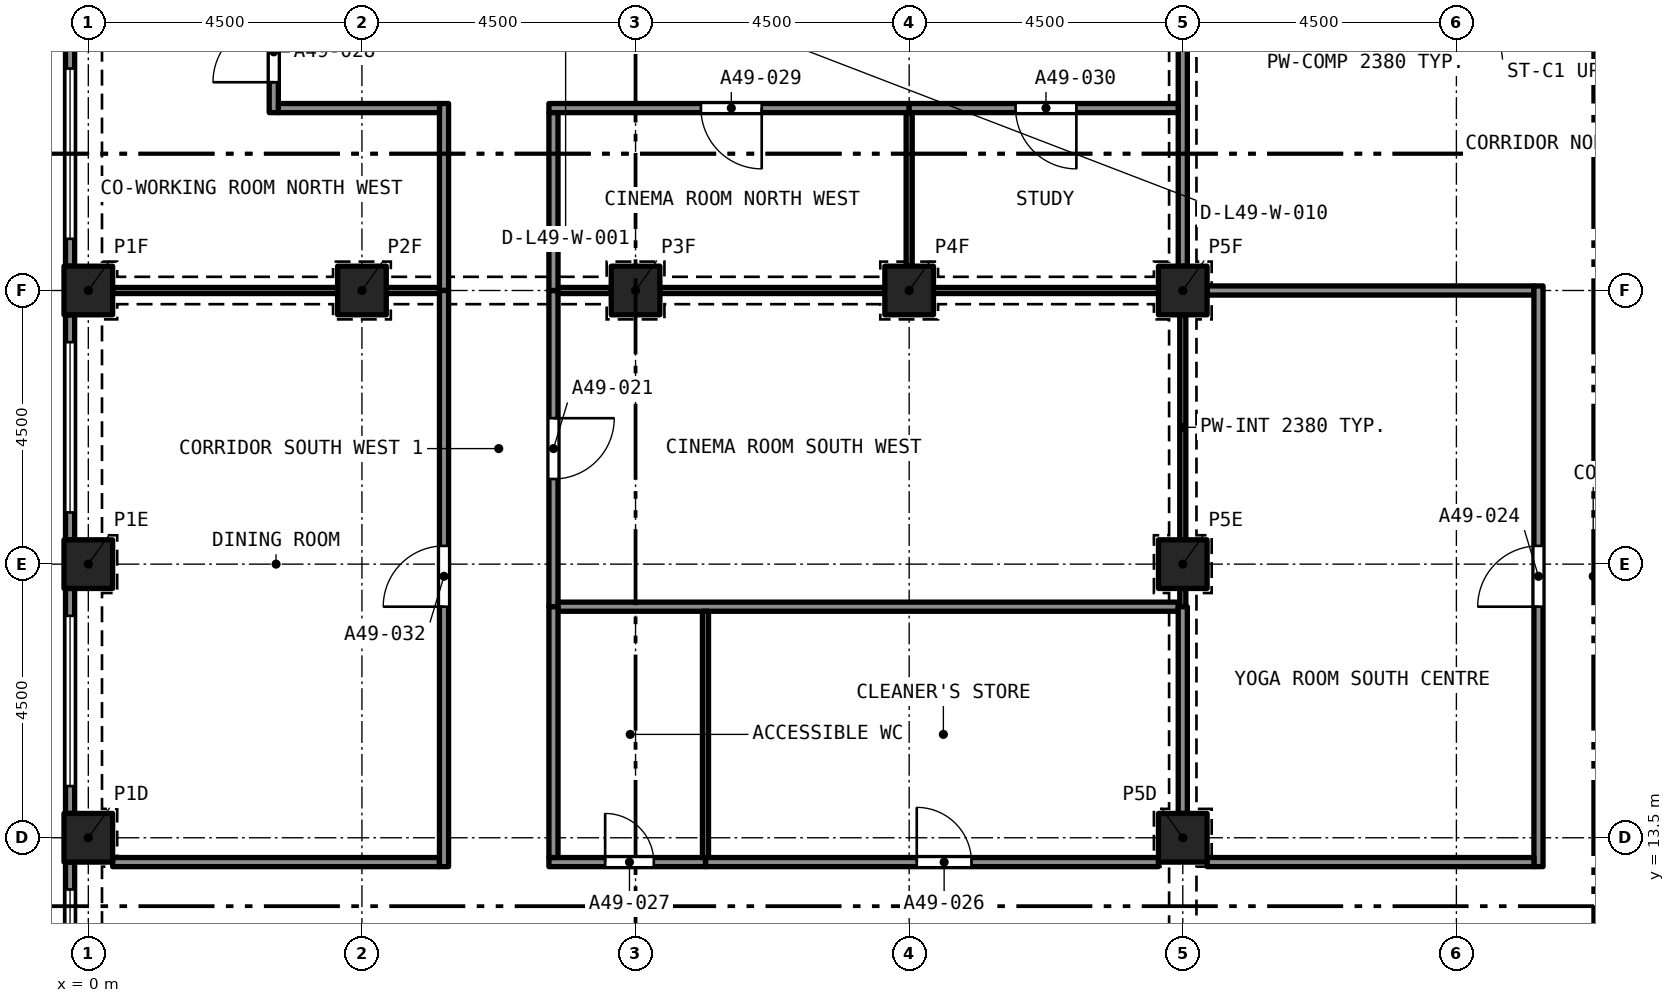
"""IFC4 building model, lengths in metres.
Left out: names, types, materials, properties, quantities, classifications, styles, units other than length and angle.
Written with IfcOpenShell. Run it as: python <this file> out.ifc"""

import sys

from ifc_helpers import new_model, si_unit, direction, frame, frame_2d, origin, origin_2d, place, context, subcontext, project, spatial, rectangle, extrude, element, fill, save


model = new_model("IFC4")
c1 = context("Model", 3, precision=1e-05, world=origin(), true_north=direction((0.0, 1.0)))
c2 = subcontext(c1, "Body", "Model", "MODEL_VIEW")
j1 = project(units=[si_unit("LENGTHUNIT", "METRE"), si_unit("PLANEANGLEUNIT", "RADIAN")], contexts=[c1])
p1 = place(None, origin())
s1 = spatial("IfcSite", under=j1, at=p1, CompositionType="ELEMENT")
p2 = place(p1, origin())
s2 = spatial("IfcBuilding", under=s1, at=p2, CompositionType="ELEMENT")
p3 = place(p2, frame((0.0, 0.0, 179.5)))
s3 = spatial("IfcBuildingStorey", under=s2, at=p3, CompositionType="ELEMENT", Elevation=179.5)
for number, where, z_axis, x_axis in (
    (1, (0.0, 13.5, 0.0), (0.0, 0.0, 1.0), (1.0, 0.0, 0.0)),
    (2, (18.0, 13.5, 0.0), (0.0, 0.0, 1.0), (1.0, 0.0, 0.0)),
    (3, (0.0, 18.0, 0.0), (0.0, 0.0, 1.0), (1.0, 0.0, 0.0)),
    (4, (18.0, 18.0, 0.0), (0.0, 0.0, 1.0), (1.0, 0.0, 0.0)),
    (5, (0.0, 22.5, 0.0), (0.0, 0.0, 1.0), (1.0, 0.0, 0.0)),
    (6, (4.5, 22.5, 0.0), (0.0, 0.0, 1.0), (1.0, 0.0, 0.0)),
    (7, (9.0, 22.5, 0.0), (0.0, 0.0, 1.0), (1.0, 0.0, 0.0)),
    (8, (13.5, 22.5, 0.0), (0.0, 0.0, 1.0), (1.0, 0.0, 0.0)),
    (9, (18.0, 22.5, 0.0), (0.0, 0.0, 1.0), (1.0, 0.0, 0.0)),
):
    element("IfcColumn", number, at=place(p3, frame(where, z_axis=z_axis, x_axis=x_axis)), inside=s3, PredefinedType="COLUMN", context=c2, shape_type="SweptSolid", body=[
        extrude(rectangle(XDim=0.8, YDim=0.8, at=origin_2d()), origin(), (0.0, 0.0, 1.0), 3.2),
    ])
p4 = place(p3, frame((-0.3, 22.9, 0.0), z_axis=(0.0, 0.0, 1.0), x_axis=(0.0, 1.0, 0.0)))
e10 = element("IfcWall", 10, at=p4, inside=s3, PredefinedType="SOLIDWALL", context=c2, shape_type="SweptSolid", body=[
    extrude(rectangle(XDim=3.7, YDim=0.15, at=frame_2d((1.85, 0.0))), origin(), (0.0, 0.0, 1.0), 3.2),
])
p5 = place(p4, frame((0.45, 0.0, 0.45)))
e11 = element("IfcOpeningElement", 11, at=p5, cuts=e10, PredefinedType="OPENING", context=c2, shape_type="SweptSolid", body=[
    extrude(rectangle(XDim=2.8, YDim=1.95, at=frame_2d((1.4, 0.975))), frame((0.0, 0.085, 0.0), z_axis=(0.0, -1.0, 0.0), x_axis=(1.0, 0.0, 0.0)), (0.0, 0.0, 1.0), 0.17),
])
p6 = place(p3, frame((-0.3, 18.4, 0.0), z_axis=(0.0, 0.0, 1.0), x_axis=(0.0, 1.0, 0.0)))
e12 = element("IfcWall", 12, at=p6, inside=s3, PredefinedType="SOLIDWALL", context=c2, shape_type="SweptSolid", body=[
    extrude(rectangle(XDim=3.7, YDim=0.15, at=frame_2d((1.85, 0.0))), origin(), (0.0, 0.0, 1.0), 3.2),
])
p7 = place(p6, frame((0.45, 0.0, 0.45)))
e13 = element("IfcOpeningElement", 13, at=p7, cuts=e12, PredefinedType="OPENING", context=c2, shape_type="SweptSolid", body=[
    extrude(rectangle(XDim=2.8, YDim=1.95, at=frame_2d((1.4, 0.975))), frame((0.0, 0.085, 0.0), z_axis=(0.0, -1.0, 0.0), x_axis=(1.0, 0.0, 0.0)), (0.0, 0.0, 1.0), 0.17),
])
p8 = place(p3, frame((-0.3, 13.9, 0.0), z_axis=(0.0, 0.0, 1.0), x_axis=(0.0, 1.0, 0.0)))
e14 = element("IfcWall", 14, at=p8, inside=s3, PredefinedType="SOLIDWALL", context=c2, shape_type="SweptSolid", body=[
    extrude(rectangle(XDim=3.7, YDim=0.15, at=frame_2d((1.85, 0.0))), origin(), (0.0, 0.0, 1.0), 3.2),
])
p9 = place(p8, frame((0.45, 0.0, 0.45)))
e15 = element("IfcOpeningElement", 15, at=p9, cuts=e14, PredefinedType="OPENING", context=c2, shape_type="SweptSolid", body=[
    extrude(rectangle(XDim=2.8, YDim=1.95, at=frame_2d((1.4, 0.975))), frame((0.0, 0.085, 0.0), z_axis=(0.0, -1.0, 0.0), x_axis=(1.0, 0.0, 0.0)), (0.0, 0.0, 1.0), 0.17),
])
p10 = place(p3, frame((-0.3, 9.4, 0.0), z_axis=(0.0, 0.0, 1.0), x_axis=(0.0, 1.0, 0.0)))
e16 = element("IfcWall", 16, at=p10, inside=s3, PredefinedType="SOLIDWALL", context=c2, shape_type="SweptSolid", body=[
    extrude(rectangle(XDim=3.7, YDim=0.15, at=frame_2d((1.85, 0.0))), origin(), (0.0, 0.0, 1.0), 3.2),
])
p11 = place(p10, frame((0.45, 0.0, 0.45)))
e17 = element("IfcOpeningElement", 17, at=p11, cuts=e16, PredefinedType="OPENING", context=c2, shape_type="SweptSolid", body=[
    extrude(rectangle(XDim=2.8, YDim=1.95, at=frame_2d((1.4, 0.975))), frame((0.0, 0.085, 0.0), z_axis=(0.0, -1.0, 0.0), x_axis=(1.0, 0.0, 0.0)), (0.0, 0.0, 1.0), 0.17),
])
p12 = place(p3, frame((18.0, 18.4, 0.0), z_axis=(0.0, 0.0, 1.0), x_axis=(0.0, 1.0, 0.0)))
e18 = element("IfcWall", 18, at=p12, inside=s3, PredefinedType="PARTITIONING", context=c2, shape_type="SweptSolid", body=[
    extrude(rectangle(XDim=3.7, YDim=0.1, at=frame_2d((1.85, 0.0))), origin(), (0.0, 0.0, 1.0), 2.38),
])
p13 = place(p3, frame((18.0, 17.3, 0.0), z_axis=(0.0, 0.0, 1.0), x_axis=(0.0, 1.0, 0.0)))
e19 = element("IfcWall", 19, at=p13, inside=s3, PredefinedType="PARTITIONING", context=c2, shape_type="SweptSolid", body=[
    extrude(rectangle(XDim=0.3, YDim=0.1, at=frame_2d((0.15, 0.0))), origin(), (0.0, 0.0, 1.0), 2.75),
])
p14 = place(p3, frame((7.65, 22.5, 0.0), z_axis=(0.0, 0.0, 1.0), x_axis=(0.0, -1.0, 0.0)))
e20 = element("IfcWall", 20, at=p14, inside=s3, PredefinedType="PARTITIONING", context=c2, shape_type="SweptSolid", body=[
    extrude(rectangle(XDim=5.2, YDim=0.15, at=frame_2d((2.6, 0.0))), origin(), (0.0, 0.0, 1.0), 2.9),
])
p15 = place(p14, frame((2.1, 0.0, 0.0)))
e21 = element("IfcOpeningElement", 21, at=p15, cuts=e20, PredefinedType="OPENING", context=c2, shape_type="SweptSolid", body=[
    extrude(rectangle(XDim=1.0, YDim=2.1, at=frame_2d((0.5, 1.05))), frame((0.0, 0.085, 0.0), z_axis=(0.0, -1.0, 0.0), x_axis=(1.0, 0.0, 0.0)), (0.0, 0.0, 1.0), 0.17),
])
p16 = place(p3, frame((7.725, 22.5, 0.0), z_axis=(0.0, 0.0, 1.0), x_axis=(1.0, 0.0, 0.0)))
e22 = element("IfcWall", 22, at=p16, inside=s3, PredefinedType="PARTITIONING", context=c2, shape_type="SweptSolid", body=[
    extrude(rectangle(XDim=0.875, YDim=0.1, at=frame_2d((0.438, 0.0))), origin(), (0.0, 0.0, 1.0), 2.38),
])
for number, where, z_axis, x_axis in (
    (23, (9.4, 22.5, 0.0), (0.0, 0.0, 1.0), (1.0, 0.0, 0.0)),
    (24, (13.9, 22.5, 0.0), (0.0, 0.0, 1.0), (1.0, 0.0, 0.0)),
):
    element("IfcWall", number, at=place(p3, frame(where, z_axis=z_axis, x_axis=x_axis)), inside=s3, PredefinedType="PARTITIONING", context=c2, shape_type="SweptSolid", body=[
        extrude(rectangle(XDim=3.7, YDim=0.1, at=frame_2d((1.85, 0.0))), origin(), (0.0, 0.0, 1.0), 2.38),
    ])
p17 = place(p3, frame((7.725, 17.3, 0.0), z_axis=(0.0, 0.0, 1.0), x_axis=(1.0, 0.0, 0.0)))
e25 = element("IfcWall", 25, at=p17, inside=s3, PredefinedType="PARTITIONING", context=c2, shape_type="SweptSolid", body=[
    extrude(rectangle(XDim=10.2, YDim=0.15, at=frame_2d((5.1, 0.0))), origin(), (0.0, 0.0, 1.0), 2.9),
])
p18 = place(p3, frame((18.4, 22.5, 0.0), z_axis=(0.0, 0.0, 1.0), x_axis=(1.0, 0.0, 0.0)))
e26 = element("IfcWall", 26, at=p18, inside=s3, PredefinedType="PARTITIONING", context=c2, shape_type="SweptSolid", body=[
    extrude(rectangle(XDim=5.375, YDim=0.15, at=frame_2d((2.688, 0.0))), origin(), (0.0, 0.0, 1.0), 2.75),
])
p19 = place(p3, frame((18.0, 22.9, 0.0), z_axis=(0.0, 0.0, 1.0), x_axis=(0.0, 1.0, 0.0)))
e27 = element("IfcWall", 27, at=p19, inside=s3, PredefinedType="PARTITIONING", context=c2, shape_type="SweptSolid", body=[
    extrude(rectangle(XDim=3.7, YDim=0.15, at=frame_2d((1.85, 0.0))), origin(), (0.0, 0.0, 1.0), 2.38),
])
p20 = place(p3, frame((23.85, 13.025, 0.0), z_axis=(0.0, 0.0, 1.0), x_axis=(0.0, 1.0, 0.0)))
e28 = element("IfcWall", 28, at=p20, inside=s3, PredefinedType="PARTITIONING", context=c2, shape_type="SweptSolid", body=[
    extrude(rectangle(XDim=9.55, YDim=0.15, at=frame_2d((4.775, 0.0))), origin(), (0.0, 0.0, 1.0), 2.75),
])
p21 = place(p20, frame((4.275, 0.0, 0.0)))
e29 = element("IfcOpeningElement", 29, at=p21, cuts=e28, PredefinedType="OPENING", context=c2, shape_type="SweptSolid", body=[
    extrude(rectangle(XDim=1.0, YDim=2.1, at=frame_2d((0.5, 1.05))), frame((0.0, 0.085, 0.0), z_axis=(0.0, -1.0, 0.0), x_axis=(1.0, 0.0, 0.0)), (0.0, 0.0, 1.0), 0.17),
])
p22 = place(p3, frame((18.4, 13.1, 0.0), z_axis=(0.0, 0.0, 1.0), x_axis=(1.0, 0.0, 0.0)))
e30 = element("IfcWall", 30, at=p22, inside=s3, PredefinedType="PARTITIONING", context=c2, shape_type="SweptSolid", body=[
    extrude(rectangle(XDim=5.375, YDim=0.15, at=frame_2d((2.688, 0.0))), origin(), (0.0, 0.0, 1.0), 2.75),
])
p23 = place(p3, frame((10.15, 13.1, 0.0), z_axis=(0.0, 0.0, 1.0), x_axis=(1.0, 0.0, 0.0)))
e31 = element("IfcWall", 31, at=p23, inside=s3, PredefinedType="PARTITIONING", context=c2, shape_type="SweptSolid", body=[
    extrude(rectangle(XDim=7.45, YDim=0.15, at=frame_2d((3.725, 0.0))), origin(), (0.0, 0.0, 1.0), 2.9),
])
p24 = place(p23, frame((3.475, 0.0, 0.0)))
e32 = element("IfcOpeningElement", 32, at=p24, cuts=e31, PredefinedType="OPENING", context=c2, shape_type="SweptSolid", body=[
    extrude(rectangle(XDim=0.9, YDim=2.1, at=frame_2d((0.45, 1.05))), frame((0.0, 0.085, 0.0), z_axis=(0.0, -1.0, 0.0), x_axis=(1.0, 0.0, 0.0)), (0.0, 0.0, 1.0), 0.17),
])
p25 = place(p3, frame((7.575, 13.1, 0.0), z_axis=(0.0, 0.0, 1.0), x_axis=(1.0, 0.0, 0.0)))
e33 = element("IfcWall", 33, at=p25, inside=s3, PredefinedType="PARTITIONING", context=c2, shape_type="SweptSolid", body=[
    extrude(rectangle(XDim=2.575, YDim=0.15, at=frame_2d((1.288, 0.0))), origin(), (0.0, 0.0, 1.0), 2.9),
])
p26 = place(p25, frame((0.925, 0.0, 0.0)))
e34 = element("IfcOpeningElement", 34, at=p26, cuts=e33, PredefinedType="OPENING", context=c2, shape_type="SweptSolid", body=[
    extrude(rectangle(XDim=0.8, YDim=2.1, at=frame_2d((0.4, 1.05))), frame((0.0, 0.085, 0.0), z_axis=(0.0, -1.0, 0.0), x_axis=(1.0, 0.0, 0.0)), (0.0, 0.0, 1.0), 0.17),
])
p27 = place(p3, frame((0.4, 13.1, 0.0), z_axis=(0.0, 0.0, 1.0), x_axis=(1.0, 0.0, 0.0)))
e35 = element("IfcWall", 35, at=p27, inside=s3, PredefinedType="PARTITIONING", context=c2, shape_type="SweptSolid", body=[
    extrude(rectangle(XDim=5.375, YDim=0.15, at=frame_2d((2.688, 0.0))), origin(), (0.0, 0.0, 1.0), 2.9),
])
p28 = place(p3, frame((18.0, 13.9, 0.0), z_axis=(0.0, 0.0, 1.0), x_axis=(0.0, 1.0, 0.0)))
e36 = element("IfcWall", 36, at=p28, inside=s3, PredefinedType="PARTITIONING", context=c2, shape_type="SweptSolid", body=[
    extrude(rectangle(XDim=3.4, YDim=0.15, at=frame_2d((1.7, 0.0))), origin(), (0.0, 0.0, 1.0), 2.38),
])
p29 = place(p3, frame((5.85, 22.5, 0.0), z_axis=(0.0, 0.0, 1.0), x_axis=(0.0, 1.0, 0.0)))
e37 = element("IfcWall", 37, at=p29, inside=s3, PredefinedType="PARTITIONING", context=c2, shape_type="SweptSolid", body=[
    extrude(rectangle(XDim=3.075, YDim=0.15, at=frame_2d((1.538, 0.0))), origin(), (0.0, 0.0, 1.0), 2.9),
])
p30 = place(p3, frame((3.125, 25.5, 0.0), z_axis=(0.0, 0.0, 1.0), x_axis=(1.0, 0.0, 0.0)))
e38 = element("IfcWall", 38, at=p30, inside=s3, PredefinedType="PARTITIONING", context=c2, shape_type="SweptSolid", body=[
    extrude(rectangle(XDim=2.65, YDim=0.15, at=frame_2d((1.325, 0.0))), origin(), (0.0, 0.0, 1.0), 2.9),
])
p31 = place(p3, frame((3.05, 25.425, 0.0), z_axis=(0.0, 0.0, 1.0), x_axis=(0.0, 1.0, 0.0)))
e39 = element("IfcWall", 39, at=p31, inside=s3, PredefinedType="PARTITIONING", context=c2, shape_type="SweptSolid", body=[
    extrude(rectangle(XDim=1.925, YDim=0.15, at=frame_2d((0.962, 0.0))), origin(), (0.0, 0.0, 1.0), 2.9),
])
p32 = place(p31, frame((0.5, 0.0, 0.0)))
e40 = element("IfcOpeningElement", 40, at=p32, cuts=e39, PredefinedType="OPENING", context=c2, shape_type="SweptSolid", body=[
    extrude(rectangle(XDim=1.0, YDim=2.1, at=frame_2d((0.5, 1.05))), frame((0.0, 0.085, 0.0), z_axis=(0.0, -1.0, 0.0), x_axis=(1.0, 0.0, 0.0)), (0.0, 0.0, 1.0), 0.17),
])
p33 = place(p3, frame((13.5, 25.5, 0.0), z_axis=(0.0, 0.0, 1.0), x_axis=(-1.0, 0.0, 0.0)))
e41 = element("IfcWall", 41, at=p33, inside=s3, PredefinedType="PARTITIONING", context=c2, shape_type="SweptSolid", body=[
    extrude(rectangle(XDim=5.925, YDim=0.15, at=frame_2d((2.962, 0.0))), origin(), (0.0, 0.0, 1.0), 2.9),
])
p34 = place(p33, frame((2.425, 0.0, 0.0)))
e42 = element("IfcOpeningElement", 42, at=p34, cuts=e41, PredefinedType="OPENING", context=c2, shape_type="SweptSolid", body=[
    extrude(rectangle(XDim=1.0, YDim=2.1, at=frame_2d((0.5, 1.05))), frame((0.0, 0.085, 0.0), z_axis=(0.0, -1.0, 0.0), x_axis=(1.0, 0.0, 0.0)), (0.0, 0.0, 1.0), 0.17),
])
p35 = place(p3, frame((7.65, 22.5, 0.0), z_axis=(0.0, 0.0, 1.0), x_axis=(0.0, 1.0, 0.0)))
e43 = element("IfcWall", 43, at=p35, inside=s3, PredefinedType="PARTITIONING", context=c2, shape_type="SweptSolid", body=[
    extrude(rectangle(XDim=2.925, YDim=0.15, at=frame_2d((1.462, 0.0))), origin(), (0.0, 0.0, 1.0), 2.9),
])
p36 = place(p3, frame((17.925, 25.5, 0.0), z_axis=(0.0, 0.0, 1.0), x_axis=(-1.0, 0.0, 0.0)))
e44 = element("IfcWall", 44, at=p36, inside=s3, PredefinedType="PARTITIONING", context=c2, shape_type="SweptSolid", body=[
    extrude(rectangle(XDim=4.425, YDim=0.15, at=frame_2d((2.212, 0.0))), origin(), (0.0, 0.0, 1.0), 2.9),
])
p37 = place(p36, frame((1.675, 0.0, 0.0)))
e45 = element("IfcOpeningElement", 45, at=p37, cuts=e44, PredefinedType="OPENING", context=c2, shape_type="SweptSolid", body=[
    extrude(rectangle(XDim=1.0, YDim=2.1, at=frame_2d((0.5, 1.05))), frame((0.0, 0.085, 0.0), z_axis=(0.0, -1.0, 0.0), x_axis=(1.0, 0.0, 0.0)), (0.0, 0.0, 1.0), 0.17),
])
p38 = place(p3, frame((7.65, 13.175, 0.0), z_axis=(0.0, 0.0, 1.0), x_axis=(0.0, 1.0, 0.0)))
e46 = element("IfcWall", 46, at=p38, inside=s3, PredefinedType="PARTITIONING", context=c2, shape_type="SweptSolid", body=[
    extrude(rectangle(XDim=4.125, YDim=0.15, at=frame_2d((2.062, 0.0))), origin(), (0.0, 0.0, 1.0), 2.9),
])
p39 = place(p3, frame((5.85, 13.025, 0.0), z_axis=(0.0, 0.0, 1.0), x_axis=(0.0, 1.0, 0.0)))
e47 = element("IfcWall", 47, at=p39, inside=s3, PredefinedType="PARTITIONING", context=c2, shape_type="SweptSolid", body=[
    extrude(rectangle(XDim=9.475, YDim=0.15, at=frame_2d((4.738, 0.0))), origin(), (0.0, 0.0, 1.0), 2.9),
])
p40 = place(p39, frame((4.275, 0.0, 0.0)))
e48 = element("IfcOpeningElement", 48, at=p40, cuts=e47, PredefinedType="OPENING", context=c2, shape_type="SweptSolid", body=[
    extrude(rectangle(XDim=1.0, YDim=2.1, at=frame_2d((0.5, 1.05))), frame((0.0, 0.085, 0.0), z_axis=(0.0, -1.0, 0.0), x_axis=(1.0, 0.0, 0.0)), (0.0, 0.0, 1.0), 0.17),
])
p41 = place(p3, frame((4.9, 22.5, 0.0), z_axis=(0.0, 0.0, 1.0), x_axis=(1.0, 0.0, 0.0)))
e49 = element("IfcWall", 49, at=p41, inside=s3, PredefinedType="PARTITIONING", context=c2, shape_type="SweptSolid", body=[
    extrude(rectangle(XDim=0.875, YDim=0.1, at=frame_2d((0.438, 0.0))), origin(), (0.0, 0.0, 1.0), 2.38),
])
p42 = place(p3, frame((0.4, 22.5, 0.0), z_axis=(0.0, 0.0, 1.0), x_axis=(1.0, 0.0, 0.0)))
e50 = element("IfcWall", 50, at=p42, inside=s3, PredefinedType="PARTITIONING", context=c2, shape_type="SweptSolid", body=[
    extrude(rectangle(XDim=3.7, YDim=0.1, at=frame_2d((1.85, 0.0))), origin(), (0.0, 0.0, 1.0), 2.38),
])
p43 = place(p3, frame((13.5, 22.9, 0.0), z_axis=(0.0, 0.0, 1.0), x_axis=(0.0, 1.0, 0.0)))
e51 = element("IfcWall", 51, at=p43, inside=s3, PredefinedType="PARTITIONING", context=c2, shape_type="SweptSolid", body=[
    extrude(rectangle(XDim=2.525, YDim=0.1, at=frame_2d((1.263, 0.0))), origin(), (0.0, 0.0, 1.0), 2.9),
])
p44 = place(p3, frame((10.15, 13.175, 0.0), z_axis=(0.0, 0.0, 1.0), x_axis=(0.0, 1.0, 0.0)))
e52 = element("IfcWall", 52, at=p44, inside=s3, PredefinedType="PARTITIONING", context=c2, shape_type="SweptSolid", body=[
    extrude(rectangle(XDim=4.05, YDim=0.1, at=frame_2d((2.025, 0.0))), origin(), (0.0, 0.0, 1.0), 2.9),
])
p45 = place(p5, origin())
e53 = element("IfcWindow", 53, at=p45, inside=s3, PartitioningType="SINGLE_PANEL", PredefinedType="WINDOW", context=c2, shape_type="SweptSolid", body=[
    extrude(rectangle(XDim=2.8, YDim=1.95, at=frame_2d((1.4, 0.975))), frame((0.0, 0.03, 0.0), z_axis=(0.0, -1.0, 0.0), x_axis=(1.0, 0.0, 0.0)), (0.0, 0.0, 1.0), 0.06),
])
fill(e11, e53)
p46 = place(p7, origin())
e54 = element("IfcWindow", 54, at=p46, inside=s3, PartitioningType="SINGLE_PANEL", PredefinedType="WINDOW", context=c2, shape_type="SweptSolid", body=[
    extrude(rectangle(XDim=2.8, YDim=1.95, at=frame_2d((1.4, 0.975))), frame((0.0, 0.03, 0.0), z_axis=(0.0, -1.0, 0.0), x_axis=(1.0, 0.0, 0.0)), (0.0, 0.0, 1.0), 0.06),
])
fill(e13, e54)
p47 = place(p9, origin())
e55 = element("IfcWindow", 55, at=p47, inside=s3, PartitioningType="SINGLE_PANEL", PredefinedType="WINDOW", context=c2, shape_type="SweptSolid", body=[
    extrude(rectangle(XDim=2.8, YDim=1.95, at=frame_2d((1.4, 0.975))), frame((0.0, 0.03, 0.0), z_axis=(0.0, -1.0, 0.0), x_axis=(1.0, 0.0, 0.0)), (0.0, 0.0, 1.0), 0.06),
])
fill(e15, e55)
p48 = place(p11, origin())
e56 = element("IfcWindow", 56, at=p48, inside=s3, PartitioningType="SINGLE_PANEL", PredefinedType="WINDOW", context=c2, shape_type="SweptSolid", body=[
    extrude(rectangle(XDim=2.8, YDim=1.95, at=frame_2d((1.4, 0.975))), frame((0.0, 0.03, 0.0), z_axis=(0.0, -1.0, 0.0), x_axis=(1.0, 0.0, 0.0)), (0.0, 0.0, 1.0), 0.06),
])
fill(e17, e56)
p49 = place(p15, origin())
e57 = element("IfcDoor", 57, at=p49, inside=s3, OperationType="SINGLE_SWING_RIGHT", PredefinedType="DOOR", context=c2, shape_type="SweptSolid", body=[
    extrude(rectangle(XDim=1.0, YDim=2.1, at=frame_2d((0.5, 1.05))), frame((0.0, 0.025, 0.0), z_axis=(0.0, -1.0, 0.0), x_axis=(1.0, 0.0, 0.0)), (0.0, 0.0, 1.0), 0.05),
])
fill(e21, e57)
p50 = place(p21, origin())
e58 = element("IfcDoor", 58, at=p50, inside=s3, OperationType="SINGLE_SWING_RIGHT", PredefinedType="DOOR", context=c2, shape_type="SweptSolid", body=[
    extrude(rectangle(XDim=1.0, YDim=2.1, at=frame_2d((0.5, 1.05))), frame((0.0, 0.025, 0.0), z_axis=(0.0, -1.0, 0.0), x_axis=(1.0, 0.0, 0.0)), (0.0, 0.0, 1.0), 0.05),
])
fill(e29, e58)
p51 = place(p24, origin())
e59 = element("IfcDoor", 59, at=p51, inside=s3, OperationType="SINGLE_SWING_RIGHT", PredefinedType="DOOR", context=c2, shape_type="SweptSolid", body=[
    extrude(rectangle(XDim=0.9, YDim=2.1, at=frame_2d((0.45, 1.05))), frame((0.0, 0.025, 0.0), z_axis=(0.0, -1.0, 0.0), x_axis=(1.0, 0.0, 0.0)), (0.0, 0.0, 1.0), 0.05),
])
fill(e32, e59)
p52 = place(p26, origin())
e60 = element("IfcDoor", 60, at=p52, inside=s3, OperationType="SINGLE_SWING_RIGHT", PredefinedType="DOOR", context=c2, shape_type="SweptSolid", body=[
    extrude(rectangle(XDim=0.8, YDim=2.1, at=frame_2d((0.4, 1.05))), frame((0.0, 0.025, 0.0), z_axis=(0.0, -1.0, 0.0), x_axis=(1.0, 0.0, 0.0)), (0.0, 0.0, 1.0), 0.05),
])
fill(e34, e60)
p53 = place(p32, origin())
e61 = element("IfcDoor", 61, at=p53, inside=s3, OperationType="SINGLE_SWING_RIGHT", PredefinedType="DOOR", context=c2, shape_type="SweptSolid", body=[
    extrude(rectangle(XDim=1.0, YDim=2.1, at=frame_2d((0.5, 1.05))), frame((0.0, 0.025, 0.0), z_axis=(0.0, -1.0, 0.0), x_axis=(1.0, 0.0, 0.0)), (0.0, 0.0, 1.0), 0.05),
])
fill(e40, e61)
p54 = place(p34, origin())
e62 = element("IfcDoor", 62, at=p54, inside=s3, OperationType="SINGLE_SWING_LEFT", PredefinedType="DOOR", context=c2, shape_type="SweptSolid", body=[
    extrude(rectangle(XDim=1.0, YDim=2.1, at=frame_2d((0.5, 1.05))), frame((0.0, 0.025, 0.0), z_axis=(0.0, -1.0, 0.0), x_axis=(1.0, 0.0, 0.0)), (0.0, 0.0, 1.0), 0.05),
])
fill(e42, e62)
p55 = place(p37, origin())
e63 = element("IfcDoor", 63, at=p55, inside=s3, OperationType="SINGLE_SWING_LEFT", PredefinedType="DOOR", context=c2, shape_type="SweptSolid", body=[
    extrude(rectangle(XDim=1.0, YDim=2.1, at=frame_2d((0.5, 1.05))), frame((0.0, 0.025, 0.0), z_axis=(0.0, -1.0, 0.0), x_axis=(1.0, 0.0, 0.0)), (0.0, 0.0, 1.0), 0.05),
])
fill(e45, e63)
p56 = place(p40, origin())
e64 = element("IfcDoor", 64, at=p56, inside=s3, OperationType="SINGLE_SWING_RIGHT", PredefinedType="DOOR", context=c2, shape_type="SweptSolid", body=[
    extrude(rectangle(XDim=1.0, YDim=2.1, at=frame_2d((0.5, 1.05))), frame((0.0, 0.025, 0.0), z_axis=(0.0, -1.0, 0.0), x_axis=(1.0, 0.0, 0.0)), (0.0, 0.0, 1.0), 0.05),
])
fill(e48, e64)
save(model, sys.argv[1])
